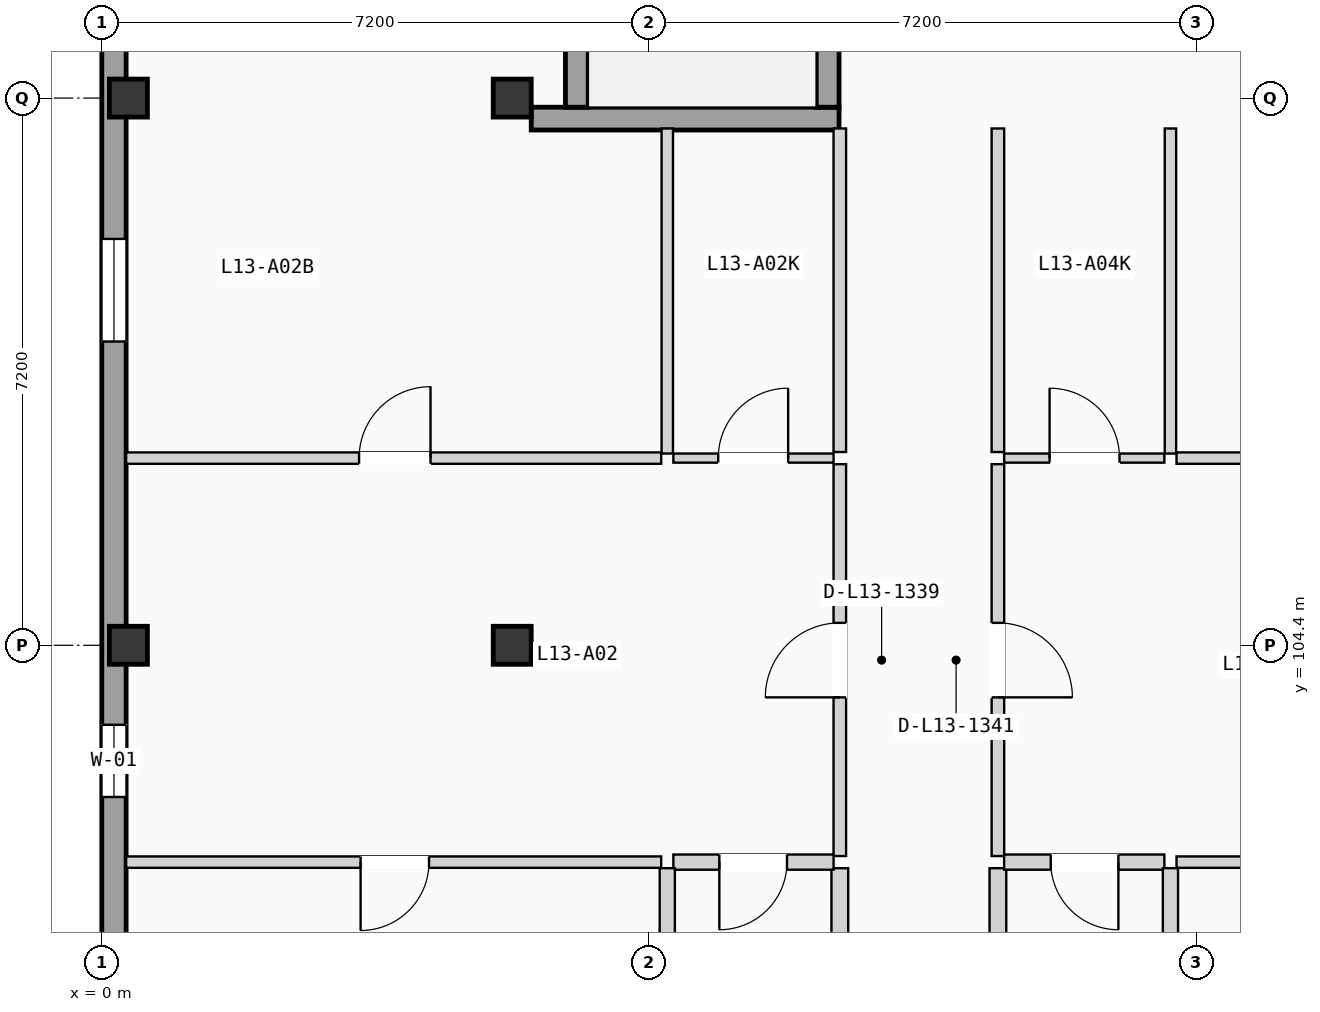
"""IFC4 building model, lengths in metres.
Left out: names, types, materials, properties, quantities, classifications, styles, units other than length and angle.
Written with IfcOpenShell. Run it as: python <this file> out.ifc"""

import sys

from ifc_helpers import new_model, si_unit, direction, frame, frame_2d, origin, origin_2d, place, context, subcontext, project, spatial, rectangle, extrude, element, fill, save


model = new_model("IFC4")
c1 = context("Model", 3, precision=1e-05, world=origin(), true_north=direction((0.0, 1.0)))
c2 = subcontext(c1, "Body", "Model", "MODEL_VIEW")
j1 = project(units=[si_unit("LENGTHUNIT", "METRE"), si_unit("PLANEANGLEUNIT", "RADIAN")], contexts=[c1])
p1 = place(None, origin())
s1 = spatial("IfcSite", under=j1, at=p1, CompositionType="ELEMENT")
p2 = place(p1, origin())
s2 = spatial("IfcBuilding", under=s1, at=p2, CompositionType="ELEMENT")
p3 = place(p2, frame((0.0, 0.0, 43.575)))
s3 = spatial("IfcBuildingStorey", under=s2, at=p3, CompositionType="ELEMENT", Elevation=43.575)
for number, where, z_axis, x_axis in (
    (1, (0.35, 104.4, 0.0), (0.0, 0.0, 1.0), (1.0, 0.0, 0.0)),
    (2, (0.35, 111.6, 0.0), (0.0, 0.0, 1.0), (1.0, 0.0, 0.0)),
    (3, (5.4, 104.4, 0.0), (0.0, 0.0, 1.0), (1.0, 0.0, 0.0)),
    (4, (5.4, 111.6, 0.0), (0.0, 0.0, 1.0), (1.0, 0.0, 0.0)),
):
    element("IfcColumn", number, at=place(p3, frame(where, z_axis=z_axis, x_axis=x_axis)), inside=s3, PredefinedType="COLUMN", context=c2, shape_type="SweptSolid", body=[
        extrude(rectangle(XDim=0.5, YDim=0.5, at=origin_2d()), origin(), (0.0, 0.0, 1.0), 3.15),
    ])
p4 = place(p3, frame((0.16, 68.72, 0.0), z_axis=(0.0, 0.0, 1.0), x_axis=(0.0, 1.0, 0.0)))
e5 = element("IfcWall", 5, at=p4, inside=s3, PredefinedType="SOLIDWALL", context=c2, shape_type="SweptSolid", body=[
    extrude(rectangle(XDim=49.76, YDim=0.32, at=frame_2d((24.88, 0.0))), origin(), (0.0, 0.0, 1.0), 2.6),
])
p5 = place(p4, frame((17.055, 0.0, 0.815)))
e6 = element("IfcOpeningElement", 6, at=p5, cuts=e5, PredefinedType="OPENING", context=c2, shape_type="SweptSolid", body=[
    extrude(rectangle(XDim=1.25, YDim=1.35, at=frame_2d((0.625, 0.675))), frame((0.0, 0.17, 0.0), z_axis=(0.0, -1.0, 0.0), x_axis=(1.0, 0.0, 0.0)), (0.0, 0.0, 1.0), 0.34),
])
p6 = place(p4, frame((9.92, 0.0, 0.665)))
e7 = element("IfcOpeningElement", 7, at=p6, cuts=e5, PredefinedType="OPENING", context=c2, shape_type="SweptSolid", body=[
    extrude(rectangle(XDim=1.25, YDim=1.5, at=frame_2d((0.625, 0.75))), frame((0.0, 0.17, 0.0), z_axis=(0.0, -1.0, 0.0), x_axis=(1.0, 0.0, 0.0)), (0.0, 0.0, 1.0), 0.34),
])
p7 = place(p4, frame((24.255, 0.0, 0.515)))
e8 = element("IfcOpeningElement", 8, at=p7, cuts=e5, PredefinedType="OPENING", context=c2, shape_type="SweptSolid", body=[
    extrude(rectangle(XDim=1.25, YDim=1.65, at=frame_2d((0.625, 0.825))), frame((0.0, 0.17, 0.0), z_axis=(0.0, -1.0, 0.0), x_axis=(1.0, 0.0, 0.0)), (0.0, 0.0, 1.0), 0.34),
])
p8 = place(p4, frame((33.684, 0.0, 0.85)))
e9 = element("IfcOpeningElement", 9, at=p8, cuts=e5, PredefinedType="OPENING", context=c2, shape_type="SweptSolid", body=[
    extrude(rectangle(XDim=0.95, YDim=1.2, at=frame_2d((0.475, 0.6))), frame((0.0, 0.17, 0.0), z_axis=(0.0, -1.0, 0.0), x_axis=(1.0, 0.0, 0.0)), (0.0, 0.0, 1.0), 0.34),
])
p9 = place(p4, frame((30.074, 0.0, 0.9)))
e10 = element("IfcOpeningElement", 10, at=p9, cuts=e5, PredefinedType="OPENING", context=c2, shape_type="SweptSolid", body=[
    extrude(rectangle(XDim=1.35, YDim=1.2, at=frame_2d((0.675, 0.6))), frame((0.0, 0.17, 0.0), z_axis=(0.0, -1.0, 0.0), x_axis=(1.0, 0.0, 0.0)), (0.0, 0.0, 1.0), 0.34),
])
p10 = place(p4, frame((39.677, 0.0, 0.815)))
e11 = element("IfcOpeningElement", 11, at=p10, cuts=e5, PredefinedType="OPENING", context=c2, shape_type="SweptSolid", body=[
    extrude(rectangle(XDim=1.35, YDim=1.35, at=frame_2d((0.675, 0.675))), frame((0.0, 0.17, 0.0), z_axis=(0.0, -1.0, 0.0), x_axis=(1.0, 0.0, 0.0)), (0.0, 0.0, 1.0), 0.34),
])
p11 = place(p3, frame((5.65, 111.33, 0.0), z_axis=(0.0, 0.0, 1.0), x_axis=(1.0, 0.0, 0.0)))
e12 = element("IfcWall", 12, at=p11, inside=s3, PredefinedType="SHEAR", context=c2, shape_type="SweptSolid", body=[
    extrude(rectangle(XDim=4.05, YDim=0.3, at=frame_2d((2.025, 0.0))), origin(), (0.0, 0.0, 1.0), 2.9),
])
p12 = place(p3, frame((6.25, 111.48, 0.0), z_axis=(0.0, 0.0, 1.0), x_axis=(0.0, 1.0, 0.0)))
e13 = element("IfcWall", 13, at=p12, inside=s3, PredefinedType="SHEAR", context=c2, shape_type="SweptSolid", body=[
    extrude(rectangle(XDim=7.0, YDim=0.3, at=frame_2d((3.5, 0.0))), origin(), (0.0, 0.0, 1.0), 2.9),
])
p13 = place(p3, frame((9.55, 111.48, 0.0), z_axis=(0.0, 0.0, 1.0), x_axis=(0.0, 1.0, 0.0)))
e14 = element("IfcWall", 14, at=p13, inside=s3, PredefinedType="SHEAR", context=c2, shape_type="SweptSolid", body=[
    extrude(rectangle(XDim=7.0, YDim=0.3, at=frame_2d((3.5, 0.0))), origin(), (0.0, 0.0, 1.0), 2.9),
])
p14 = place(p13, frame((5.625, 0.0, 0.0)))
e15 = element("IfcOpeningElement", 15, at=p14, cuts=e14, PredefinedType="OPENING", context=c2, shape_type="SweptSolid", body=[
    extrude(rectangle(XDim=1.15, YDim=2.12, at=frame_2d((0.575, 1.06))), frame((0.0, 0.16, 0.0), z_axis=(0.0, -1.0, 0.0), x_axis=(1.0, 0.0, 0.0)), (0.0, 0.0, 1.0), 0.32),
])
p15 = place(p3, frame((9.71, 101.627, 0.0), z_axis=(0.0, 0.0, 1.0), x_axis=(0.0, 1.0, 0.0)))
e16 = element("IfcWall", 16, at=p15, inside=s3, PredefinedType="PARTITIONING", context=c2, shape_type="SweptSolid", body=[
    extrude(rectangle(XDim=5.156, YDim=0.165, at=frame_2d((2.578, 0.0))), origin(), (0.0, 0.0, 1.0), 2.87),
])
p16 = place(p15, frame((2.088, 0.0, 0.0)))
e17 = element("IfcOpeningElement", 17, at=p16, cuts=e16, PredefinedType="OPENING", context=c2, shape_type="SweptSolid", body=[
    extrude(rectangle(XDim=0.98, YDim=2.08, at=frame_2d((0.49, 1.04))), frame((0.0, 0.093, 0.0), z_axis=(0.0, -1.0, 0.0), x_axis=(1.0, 0.0, 0.0)), (0.0, 0.0, 1.0), 0.185),
])
p17 = place(p3, frame((9.71, 97.21, 0.0), z_axis=(0.0, 0.0, 1.0), x_axis=(0.0, 1.0, 0.0)))
e18 = element("IfcWall", 18, at=p17, inside=s3, PredefinedType="PLUMBINGWALL", context=c2, shape_type="SweptSolid", body=[
    extrude(rectangle(XDim=4.257, YDim=0.22, at=frame_2d((2.128, 0.0))), origin(), (0.0, 0.0, 1.0), 2.87),
])
p18 = place(p3, frame((9.71, 106.943, 0.0), z_axis=(0.0, 0.0, 1.0), x_axis=(0.0, 1.0, 0.0)))
e19 = element("IfcWall", 19, at=p18, inside=s3, PredefinedType="PARTITIONING", context=c2, shape_type="SweptSolid", body=[
    extrude(rectangle(XDim=4.257, YDim=0.165, at=frame_2d((2.128, 0.0))), origin(), (0.0, 0.0, 1.0), 2.87),
])
p19 = place(p3, frame((11.79, 101.627, 0.0), z_axis=(0.0, 0.0, 1.0), x_axis=(0.0, 1.0, 0.0)))
e20 = element("IfcWall", 20, at=p19, inside=s3, PredefinedType="PARTITIONING", context=c2, shape_type="SweptSolid", body=[
    extrude(rectangle(XDim=5.156, YDim=0.165, at=frame_2d((2.578, 0.0))), origin(), (0.0, 0.0, 1.0), 2.87),
])
p20 = place(p19, frame((2.088, 0.0, 0.0)))
e21 = element("IfcOpeningElement", 21, at=p20, cuts=e20, PredefinedType="OPENING", context=c2, shape_type="SweptSolid", body=[
    extrude(rectangle(XDim=0.98, YDim=2.08, at=frame_2d((0.49, 1.04))), frame((0.0, 0.093, 0.0), z_axis=(0.0, -1.0, 0.0), x_axis=(1.0, 0.0, 0.0)), (0.0, 0.0, 1.0), 0.185),
])
p21 = place(p3, frame((11.79, 97.21, 0.0), z_axis=(0.0, 0.0, 1.0), x_axis=(0.0, 1.0, 0.0)))
e22 = element("IfcWall", 22, at=p21, inside=s3, PredefinedType="PLUMBINGWALL", context=c2, shape_type="SweptSolid", body=[
    extrude(rectangle(XDim=4.257, YDim=0.22, at=frame_2d((2.128, 0.0))), origin(), (0.0, 0.0, 1.0), 2.87),
])
p22 = place(p3, frame((11.79, 106.943, 0.0), z_axis=(0.0, 0.0, 1.0), x_axis=(0.0, 1.0, 0.0)))
e23 = element("IfcWall", 23, at=p22, inside=s3, PredefinedType="PARTITIONING", context=c2, shape_type="SweptSolid", body=[
    extrude(rectangle(XDim=4.257, YDim=0.165, at=frame_2d((2.128, 0.0))), origin(), (0.0, 0.0, 1.0), 2.87),
])
p23 = place(p3, frame((7.52, 101.547, 0.0), z_axis=(0.0, 0.0, 1.0), x_axis=(1.0, 0.0, 0.0)))
e24 = element("IfcWall", 24, at=p23, inside=s3, PredefinedType="PLUMBINGWALL", context=c2, shape_type="SweptSolid", body=[
    extrude(rectangle(XDim=2.108, YDim=0.2, at=frame_2d((1.054, 0.0))), origin(), (0.0, 0.0, 1.0), 2.87),
])
p24 = place(p23, frame((0.605, 0.0, 0.0)))
e25 = element("IfcOpeningElement", 25, at=p24, cuts=e24, PredefinedType="OPENING", context=c2, shape_type="SweptSolid", body=[
    extrude(rectangle(XDim=0.89, YDim=2.03, at=frame_2d((0.445, 1.015))), frame((0.0, 0.11, 0.0), z_axis=(0.0, -1.0, 0.0), x_axis=(1.0, 0.0, 0.0)), (0.0, 0.0, 1.0), 0.22),
])
p25 = place(p3, frame((7.52, 106.863, 0.0), z_axis=(0.0, 0.0, 1.0), x_axis=(1.0, 0.0, 0.0)))
e26 = element("IfcWall", 26, at=p25, inside=s3, PredefinedType="PARTITIONING", context=c2, shape_type="SweptSolid", body=[
    extrude(rectangle(XDim=2.108, YDim=0.12, at=frame_2d((1.054, 0.0))), origin(), (0.0, 0.0, 1.0), 2.87),
])
p26 = place(p25, frame((0.59, 0.0, 0.0)))
e27 = element("IfcOpeningElement", 27, at=p26, cuts=e26, PredefinedType="OPENING", context=c2, shape_type="SweptSolid", body=[
    extrude(rectangle(XDim=0.92, YDim=2.02, at=frame_2d((0.46, 1.01))), frame((0.0, 0.07, 0.0), z_axis=(0.0, -1.0, 0.0), x_axis=(1.0, 0.0, 0.0)), (0.0, 0.0, 1.0), 0.14),
])
p27 = place(p3, frame((0.32, 101.547, 0.0), z_axis=(0.0, 0.0, 1.0), x_axis=(1.0, 0.0, 0.0)))
e28 = element("IfcWall", 28, at=p27, inside=s3, PredefinedType="PARTITIONING", context=c2, shape_type="SweptSolid", body=[
    extrude(rectangle(XDim=7.04, YDim=0.15, at=frame_2d((3.52, 0.0))), origin(), (0.0, 0.0, 1.0), 2.87),
])
p28 = place(p27, frame((3.085, 0.0, 0.0)))
e29 = element("IfcOpeningElement", 29, at=p28, cuts=e28, PredefinedType="OPENING", context=c2, shape_type="SweptSolid", body=[
    extrude(rectangle(XDim=0.9, YDim=2.04, at=frame_2d((0.45, 1.02))), frame((0.0, 0.085, 0.0), z_axis=(0.0, -1.0, 0.0), x_axis=(1.0, 0.0, 0.0)), (0.0, 0.0, 1.0), 0.17),
])
p29 = place(p3, frame((0.32, 106.863, 0.0), z_axis=(0.0, 0.0, 1.0), x_axis=(1.0, 0.0, 0.0)))
e30 = element("IfcWall", 30, at=p29, inside=s3, PredefinedType="PARTITIONING", context=c2, shape_type="SweptSolid", body=[
    extrude(rectangle(XDim=7.04, YDim=0.15, at=frame_2d((3.52, 0.0))), origin(), (0.0, 0.0, 1.0), 2.87),
])
p30 = place(p29, frame((3.065, 0.0, 0.0)))
e31 = element("IfcOpeningElement", 31, at=p30, cuts=e30, PredefinedType="OPENING", context=c2, shape_type="SweptSolid", body=[
    extrude(rectangle(XDim=0.94, YDim=2.06, at=frame_2d((0.47, 1.03))), frame((0.0, 0.085, 0.0), z_axis=(0.0, -1.0, 0.0), x_axis=(1.0, 0.0, 0.0)), (0.0, 0.0, 1.0), 0.17),
])
p31 = place(p3, frame((7.44, 97.21, 0.0), z_axis=(0.0, 0.0, 1.0), x_axis=(0.0, 1.0, 0.0)))
e32 = element("IfcWall", 32, at=p31, inside=s3, PredefinedType="PLUMBINGWALL", context=c2, shape_type="SweptSolid", body=[
    extrude(rectangle(XDim=4.257, YDim=0.2, at=frame_2d((2.128, 0.0))), origin(), (0.0, 0.0, 1.0), 2.87),
])
p32 = place(p3, frame((7.44, 106.923, 0.0), z_axis=(0.0, 0.0, 1.0), x_axis=(0.0, 1.0, 0.0)))
e33 = element("IfcWall", 33, at=p32, inside=s3, PredefinedType="PARTITIONING", context=c2, shape_type="SweptSolid", body=[
    extrude(rectangle(XDim=4.277, YDim=0.15, at=frame_2d((2.138, 0.0))), origin(), (0.0, 0.0, 1.0), 2.87),
])
p33 = place(p3, frame((11.872, 101.547, 0.0), z_axis=(0.0, 0.0, 1.0), x_axis=(1.0, 0.0, 0.0)))
e34 = element("IfcWall", 34, at=p33, inside=s3, PredefinedType="PLUMBINGWALL", context=c2, shape_type="SweptSolid", body=[
    extrude(rectangle(XDim=2.108, YDim=0.2, at=frame_2d((1.054, 0.0))), origin(), (0.0, 0.0, 1.0), 2.87),
])
p34 = place(p33, frame((0.613, 0.0, 0.0)))
e35 = element("IfcOpeningElement", 35, at=p34, cuts=e34, PredefinedType="OPENING", context=c2, shape_type="SweptSolid", body=[
    extrude(rectangle(XDim=0.89, YDim=2.03, at=frame_2d((0.445, 1.015))), frame((0.0, 0.11, 0.0), z_axis=(0.0, -1.0, 0.0), x_axis=(1.0, 0.0, 0.0)), (0.0, 0.0, 1.0), 0.22),
])
p35 = place(p3, frame((11.872, 106.863, 0.0), z_axis=(0.0, 0.0, 1.0), x_axis=(1.0, 0.0, 0.0)))
e36 = element("IfcWall", 36, at=p35, inside=s3, PredefinedType="PARTITIONING", context=c2, shape_type="SweptSolid", body=[
    extrude(rectangle(XDim=2.108, YDim=0.12, at=frame_2d((1.054, 0.0))), origin(), (0.0, 0.0, 1.0), 2.87),
])
p36 = place(p35, frame((0.598, 0.0, 0.0)))
e37 = element("IfcOpeningElement", 37, at=p36, cuts=e36, PredefinedType="OPENING", context=c2, shape_type="SweptSolid", body=[
    extrude(rectangle(XDim=0.92, YDim=2.02, at=frame_2d((0.46, 1.01))), frame((0.0, 0.07, 0.0), z_axis=(0.0, -1.0, 0.0), x_axis=(1.0, 0.0, 0.0)), (0.0, 0.0, 1.0), 0.14),
])
p37 = place(p3, frame((14.14, 101.547, 0.0), z_axis=(0.0, 0.0, 1.0), x_axis=(1.0, 0.0, 0.0)))
e38 = element("IfcWall", 38, at=p37, inside=s3, PredefinedType="PARTITIONING", context=c2, shape_type="SweptSolid", body=[
    extrude(rectangle(XDim=7.14, YDim=0.15, at=frame_2d((3.57, 0.0))), origin(), (0.0, 0.0, 1.0), 2.87),
])
p38 = place(p37, frame((3.015, 0.0, 0.0)))
e39 = element("IfcOpeningElement", 39, at=p38, cuts=e38, PredefinedType="OPENING", context=c2, shape_type="SweptSolid", body=[
    extrude(rectangle(XDim=1.08, YDim=2.1, at=frame_2d((0.54, 1.05))), frame((0.0, 0.085, 0.0), z_axis=(0.0, -1.0, 0.0), x_axis=(1.0, 0.0, 0.0)), (0.0, 0.0, 1.0), 0.17),
])
p39 = place(p3, frame((14.14, 106.863, 0.0), z_axis=(0.0, 0.0, 1.0), x_axis=(1.0, 0.0, 0.0)))
e40 = element("IfcWall", 40, at=p39, inside=s3, PredefinedType="PARTITIONING", context=c2, shape_type="SweptSolid", body=[
    extrude(rectangle(XDim=7.14, YDim=0.15, at=frame_2d((3.57, 0.0))), origin(), (0.0, 0.0, 1.0), 2.87),
])
p40 = place(p39, frame((3.105, 0.0, 0.0)))
e41 = element("IfcOpeningElement", 41, at=p40, cuts=e40, PredefinedType="OPENING", context=c2, shape_type="SweptSolid", body=[
    extrude(rectangle(XDim=0.9, YDim=2.04, at=frame_2d((0.45, 1.02))), frame((0.0, 0.085, 0.0), z_axis=(0.0, -1.0, 0.0), x_axis=(1.0, 0.0, 0.0)), (0.0, 0.0, 1.0), 0.17),
])
p41 = place(p3, frame((14.06, 97.21, 0.0), z_axis=(0.0, 0.0, 1.0), x_axis=(0.0, 1.0, 0.0)))
e42 = element("IfcWall", 42, at=p41, inside=s3, PredefinedType="PLUMBINGWALL", context=c2, shape_type="SweptSolid", body=[
    extrude(rectangle(XDim=4.257, YDim=0.2, at=frame_2d((2.128, 0.0))), origin(), (0.0, 0.0, 1.0), 2.87),
])
p42 = place(p3, frame((14.06, 106.923, 0.0), z_axis=(0.0, 0.0, 1.0), x_axis=(0.0, 1.0, 0.0)))
e43 = element("IfcWall", 43, at=p42, inside=s3, PredefinedType="PARTITIONING", context=c2, shape_type="SweptSolid", body=[
    extrude(rectangle(XDim=4.277, YDim=0.15, at=frame_2d((2.138, 0.0))), origin(), (0.0, 0.0, 1.0), 2.87),
])
p43 = place(p8, origin())
e44 = element("IfcWindow", 44, at=p43, inside=s3, PartitioningType="SINGLE_PANEL", PredefinedType="WINDOW", context=c2, shape_type="SweptSolid", body=[
    extrude(rectangle(XDim=0.95, YDim=1.2, at=frame_2d((0.475, 0.6))), frame((0.0, 0.03, 0.0), z_axis=(0.0, -1.0, 0.0), x_axis=(1.0, 0.0, 0.0)), (0.0, 0.0, 1.0), 0.06),
])
fill(e9, e44)
p44 = place(p10, origin())
e45 = element("IfcWindow", 45, at=p44, inside=s3, PartitioningType="SINGLE_PANEL", PredefinedType="WINDOW", context=c2, shape_type="SweptSolid", body=[
    extrude(rectangle(XDim=1.35, YDim=1.35, at=frame_2d((0.675, 0.675))), frame((0.0, 0.03, 0.0), z_axis=(0.0, -1.0, 0.0), x_axis=(1.0, 0.0, 0.0)), (0.0, 0.0, 1.0), 0.06),
])
fill(e11, e45)
p45 = place(p16, origin())
e46 = element("IfcDoor", 46, at=p45, inside=s3, OperationType="SINGLE_SWING_LEFT", PredefinedType="DOOR", context=c2, shape_type="SweptSolid", body=[
    extrude(rectangle(XDim=0.98, YDim=2.08, at=frame_2d((0.49, 1.04))), frame((0.0, 0.025, 0.0), z_axis=(0.0, -1.0, 0.0), x_axis=(1.0, 0.0, 0.0)), (0.0, 0.0, 1.0), 0.05),
])
fill(e17, e46)
p46 = place(p20, frame((0.98, 0.0, 0.0), z_axis=(0.0, 0.0, 1.0), x_axis=(-1.0, 0.0, 0.0)))
e47 = element("IfcDoor", 47, at=p46, inside=s3, OperationType="SINGLE_SWING_LEFT", PredefinedType="DOOR", context=c2, shape_type="SweptSolid", body=[
    extrude(rectangle(XDim=0.98, YDim=2.08, at=frame_2d((0.49, 1.04))), frame((0.0, 0.025, 0.0), z_axis=(0.0, -1.0, 0.0), x_axis=(1.0, 0.0, 0.0)), (0.0, 0.0, 1.0), 0.05),
])
fill(e21, e47)
p47 = place(p24, frame((0.89, 0.0, 0.0), z_axis=(0.0, 0.0, 1.0), x_axis=(-1.0, 0.0, 0.0)))
e48 = element("IfcDoor", 48, at=p47, inside=s3, OperationType="SINGLE_SWING_LEFT", PredefinedType="DOOR", context=c2, shape_type="SweptSolid", body=[
    extrude(rectangle(XDim=0.89, YDim=2.03, at=frame_2d((0.445, 1.015))), frame((0.0, 0.025, 0.0), z_axis=(0.0, -1.0, 0.0), x_axis=(1.0, 0.0, 0.0)), (0.0, 0.0, 1.0), 0.05),
])
fill(e25, e48)
p48 = place(p26, origin())
e49 = element("IfcDoor", 49, at=p48, inside=s3, OperationType="SINGLE_SWING_RIGHT", PredefinedType="DOOR", context=c2, shape_type="SweptSolid", body=[
    extrude(rectangle(XDim=0.92, YDim=2.02, at=frame_2d((0.46, 1.01))), frame((0.0, 0.025, 0.0), z_axis=(0.0, -1.0, 0.0), x_axis=(1.0, 0.0, 0.0)), (0.0, 0.0, 1.0), 0.05),
])
fill(e27, e49)
p49 = place(p28, frame((0.9, 0.0, 0.0), z_axis=(0.0, 0.0, 1.0), x_axis=(-1.0, 0.0, 0.0)))
e50 = element("IfcDoor", 50, at=p49, inside=s3, OperationType="SINGLE_SWING_LEFT", PredefinedType="DOOR", context=c2, shape_type="SweptSolid", body=[
    extrude(rectangle(XDim=0.9, YDim=2.04, at=frame_2d((0.45, 1.02))), frame((0.0, 0.025, 0.0), z_axis=(0.0, -1.0, 0.0), x_axis=(1.0, 0.0, 0.0)), (0.0, 0.0, 1.0), 0.05),
])
fill(e29, e50)
p50 = place(p30, origin())
e51 = element("IfcDoor", 51, at=p50, inside=s3, OperationType="SINGLE_SWING_RIGHT", PredefinedType="DOOR", context=c2, shape_type="SweptSolid", body=[
    extrude(rectangle(XDim=0.94, YDim=2.06, at=frame_2d((0.47, 1.03))), frame((0.0, 0.025, 0.0), z_axis=(0.0, -1.0, 0.0), x_axis=(1.0, 0.0, 0.0)), (0.0, 0.0, 1.0), 0.05),
])
fill(e31, e51)
p51 = place(p34, frame((0.89, 0.0, 0.0), z_axis=(0.0, 0.0, 1.0), x_axis=(-1.0, 0.0, 0.0)))
e52 = element("IfcDoor", 52, at=p51, inside=s3, OperationType="SINGLE_SWING_RIGHT", PredefinedType="DOOR", context=c2, shape_type="SweptSolid", body=[
    extrude(rectangle(XDim=0.89, YDim=2.03, at=frame_2d((0.445, 1.015))), frame((0.0, 0.025, 0.0), z_axis=(0.0, -1.0, 0.0), x_axis=(1.0, 0.0, 0.0)), (0.0, 0.0, 1.0), 0.05),
])
fill(e35, e52)
p52 = place(p36, origin())
e53 = element("IfcDoor", 53, at=p52, inside=s3, OperationType="SINGLE_SWING_LEFT", PredefinedType="DOOR", context=c2, shape_type="SweptSolid", body=[
    extrude(rectangle(XDim=0.92, YDim=2.02, at=frame_2d((0.46, 1.01))), frame((0.0, 0.025, 0.0), z_axis=(0.0, -1.0, 0.0), x_axis=(1.0, 0.0, 0.0)), (0.0, 0.0, 1.0), 0.05),
])
fill(e37, e53)
save(model, sys.argv[1])
